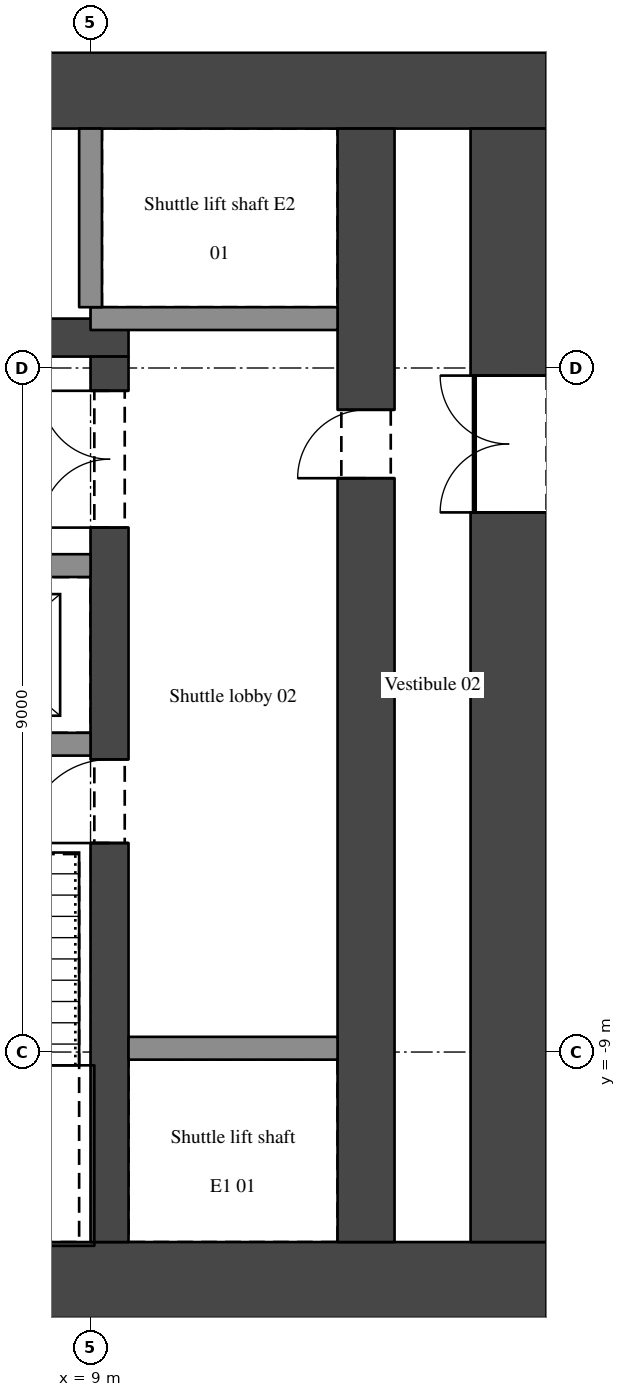
"""IFC4 building model, lengths in metres.
Left out: names, types, materials, properties, quantities, classifications, styles, units other than length and angle.
Written with IfcOpenShell. Run it as: python <this file> out.ifc"""

import sys

from ifc_helpers import new_model, si_unit, direction, frame, frame_2d, origin, place, context, subcontext, project, spatial, rectangle, extrude, element, fill, save


model = new_model("IFC4")
c1 = context("Model", 3, precision=1e-05, world=origin(), true_north=direction((0.0, 1.0)))
c2 = subcontext(c1, "Body", "Model", "MODEL_VIEW")
j1 = project(units=[si_unit("LENGTHUNIT", "METRE"), si_unit("PLANEANGLEUNIT", "RADIAN")], contexts=[c1])
p1 = place(None, origin())
s1 = spatial("IfcSite", under=j1, at=p1, CompositionType="ELEMENT")
p2 = place(p1, origin())
s2 = spatial("IfcBuilding", under=s1, at=p2, CompositionType="ELEMENT")
p3 = place(p2, frame((0.0, 0.0, 53.7)))
s3 = spatial("IfcBuildingStorey", under=s2, at=p3, CompositionType="ELEMENT", Elevation=53.7)
for number, where, z_axis, x_axis in (
    (1, (-15.0, -12.0, 0.0), (0.0, 0.0, 1.0), (1.0, 0.0, 0.0)),
    (2, (-15.0, 3.65, 0.0), (0.0, 0.0, 1.0), (1.0, 0.0, 0.0)),
):
    element("IfcWall", number, at=place(p3, frame(where, z_axis=z_axis, x_axis=x_axis)), inside=s3, PredefinedType="SHEAR", context=c2, shape_type="SweptSolid", body=[
        extrude(rectangle(XDim=30.0, YDim=1.0, at=frame_2d((15.0, 0.0))), origin(), (0.0, 0.0, 1.0), 3.9),
    ])
p4 = place(p3, frame((14.5, -11.5, 0.0), z_axis=(0.0, 0.0, 1.0), x_axis=(0.0, 1.0, 0.0)))
e3 = element("IfcWall", 3, at=p4, inside=s3, PredefinedType="SHEAR", context=c2, shape_type="SweptSolid", body=[
    extrude(rectangle(XDim=14.65, YDim=1.0, at=frame_2d((7.325, 0.0))), origin(), (0.0, 0.0, 1.0), 3.9),
])
p5 = place(p4, frame((9.6, 0.0, 0.0)))
e4 = element("IfcOpeningElement", 4, at=p5, cuts=e3, PredefinedType="OPENING", context=c2, shape_type="SweptSolid", body=[
    extrude(rectangle(XDim=1.8, YDim=2.1, at=frame_2d((0.9, 1.05))), frame((0.0, 0.51, 0.0), z_axis=(0.0, -1.0, 0.0), x_axis=(1.0, 0.0, 0.0)), (0.0, 0.0, 1.0), 1.02),
])
p6 = place(p3, frame((12.625, -11.5, 0.0), z_axis=(0.0, 0.0, 1.0), x_axis=(0.0, 1.0, 0.0)))
e5 = element("IfcWall", 5, at=p6, inside=s3, PredefinedType="SHEAR", context=c2, shape_type="SweptSolid", body=[
    extrude(rectangle(XDim=14.65, YDim=0.75, at=frame_2d((7.325, 0.0))), origin(), (0.0, 0.0, 1.0), 3.9),
])
p7 = place(p6, frame((10.05, 0.0, 0.0)))
e6 = element("IfcOpeningElement", 6, at=p7, cuts=e5, PredefinedType="OPENING", context=c2, shape_type="SweptSolid", body=[
    extrude(rectangle(XDim=0.9, YDim=2.1, at=frame_2d((0.45, 1.05))), frame((0.0, 0.385, 0.0), z_axis=(0.0, -1.0, 0.0), x_axis=(1.0, 0.0, 0.0)), (0.0, 0.0, 1.0), 0.77),
])
p8 = place(p3, frame((-9.5, 0.4, 0.0), z_axis=(0.0, 0.0, 1.0), x_axis=(1.0, 0.0, 0.0)))
e7 = element("IfcWall", 7, at=p8, inside=s3, PredefinedType="SHEAR", context=c2, shape_type="SweptSolid", body=[
    extrude(rectangle(XDim=19.0, YDim=0.5, at=frame_2d((9.5, 0.0))), origin(), (0.0, 0.0, 1.0), 3.9),
])
p9 = place(p8, frame((1.4, 0.0, 0.0)))
e8 = element("IfcOpeningElement", 8, at=p9, cuts=e7, PredefinedType="OPENING", context=c2, shape_type="SweptSolid", body=[
    extrude(rectangle(XDim=0.9, YDim=2.1, at=frame_2d((0.45, 1.05))), frame((0.0, 0.26, 0.0), z_axis=(0.0, -1.0, 0.0), x_axis=(1.0, 0.0, 0.0)), (0.0, 0.0, 1.0), 0.52),
])
p10 = place(p8, frame((4.1, 0.0, 0.0)))
e9 = element("IfcOpeningElement", 9, at=p10, cuts=e7, PredefinedType="OPENING", context=c2, shape_type="SweptSolid", body=[
    extrude(rectangle(XDim=0.9, YDim=2.1, at=frame_2d((0.45, 1.05))), frame((0.0, 0.26, 0.0), z_axis=(0.0, -1.0, 0.0), x_axis=(1.0, 0.0, 0.0)), (0.0, 0.0, 1.0), 0.52),
])
p11 = place(p8, frame((6.8, 0.0, 0.0)))
e10 = element("IfcOpeningElement", 10, at=p11, cuts=e7, PredefinedType="OPENING", context=c2, shape_type="SweptSolid", body=[
    extrude(rectangle(XDim=0.9, YDim=2.1, at=frame_2d((0.45, 1.05))), frame((0.0, 0.26, 0.0), z_axis=(0.0, -1.0, 0.0), x_axis=(1.0, 0.0, 0.0)), (0.0, 0.0, 1.0), 0.52),
])
p12 = place(p8, frame((11.3, 0.0, 0.0)))
e11 = element("IfcOpeningElement", 11, at=p12, cuts=e7, PredefinedType="OPENING", context=c2, shape_type="SweptSolid", body=[
    extrude(rectangle(XDim=0.9, YDim=2.1, at=frame_2d((0.45, 1.05))), frame((0.0, 0.26, 0.0), z_axis=(0.0, -1.0, 0.0), x_axis=(1.0, 0.0, 0.0)), (0.0, 0.0, 1.0), 0.52),
])
p13 = place(p8, frame((14.0, 0.0, 0.0)))
e12 = element("IfcOpeningElement", 12, at=p13, cuts=e7, PredefinedType="OPENING", context=c2, shape_type="SweptSolid", body=[
    extrude(rectangle(XDim=0.9, YDim=2.1, at=frame_2d((0.45, 1.05))), frame((0.0, 0.26, 0.0), z_axis=(0.0, -1.0, 0.0), x_axis=(1.0, 0.0, 0.0)), (0.0, 0.0, 1.0), 0.52),
])
p14 = place(p8, frame((16.7, 0.0, 0.0)))
e13 = element("IfcOpeningElement", 13, at=p14, cuts=e7, PredefinedType="OPENING", context=c2, shape_type="SweptSolid", body=[
    extrude(rectangle(XDim=0.9, YDim=2.1, at=frame_2d((0.45, 1.05))), frame((0.0, 0.26, 0.0), z_axis=(0.0, -1.0, 0.0), x_axis=(1.0, 0.0, 0.0)), (0.0, 0.0, 1.0), 0.52),
])
p15 = place(p8, frame((9.05, 0.0, 0.0)))
e14 = element("IfcOpeningElement", 14, at=p15, cuts=e7, PredefinedType="OPENING", context=c2, shape_type="SweptSolid", body=[
    extrude(rectangle(XDim=0.9, YDim=2.1, at=frame_2d((0.45, 1.05))), frame((0.0, 0.26, 0.0), z_axis=(0.0, -1.0, 0.0), x_axis=(1.0, 0.0, 0.0)), (0.0, 0.0, 1.0), 0.52),
])
p16 = place(p3, frame((9.25, -11.5, 0.0), z_axis=(0.0, 0.0, 1.0), x_axis=(0.0, 1.0, 0.0)))
e15 = element("IfcWall", 15, at=p16, inside=s3, PredefinedType="SHEAR", context=c2, shape_type="SweptSolid", body=[
    extrude(rectangle(XDim=11.65, YDim=0.5, at=frame_2d((5.825, 0.0))), origin(), (0.0, 0.0, 1.0), 3.9),
])
p17 = place(p16, frame((9.4, 0.0, 0.0)))
e16 = element("IfcOpeningElement", 16, at=p17, cuts=e15, PredefinedType="OPENING", context=c2, shape_type="SweptSolid", body=[
    extrude(rectangle(XDim=1.8, YDim=2.1, at=frame_2d((0.9, 1.05))), frame((0.0, 0.26, 0.0), z_axis=(0.0, -1.0, 0.0), x_axis=(1.0, 0.0, 0.0)), (0.0, 0.0, 1.0), 0.52),
])
p18 = place(p16, frame((5.25, 0.0, 0.0)))
e17 = element("IfcOpeningElement", 17, at=p18, cuts=e15, PredefinedType="OPENING", context=c2, shape_type="SweptSolid", body=[
    extrude(rectangle(XDim=1.1, YDim=2.1, at=frame_2d((0.55, 1.05))), frame((0.0, 0.26, 0.0), z_axis=(0.0, -1.0, 0.0), x_axis=(1.0, 0.0, 0.0)), (0.0, 0.0, 1.0), 0.52),
])
p19 = place(p3, frame((9.5, -8.95, 0.0), z_axis=(0.0, 0.0, 1.0), x_axis=(1.0, 0.0, 0.0)))
e18 = element("IfcWall", 18, at=p19, inside=s3, PredefinedType="SHEAR", context=c2, shape_type="SweptSolid", body=[
    extrude(rectangle(XDim=2.75, YDim=0.3, at=frame_2d((1.375, 0.0))), origin(), (0.0, 0.0, 1.0), 3.9),
])
p20 = place(p3, frame((0.9, -4.95, 0.0), z_axis=(0.0, 0.0, 1.0), x_axis=(1.0, 0.0, 0.0)))
e19 = element("IfcWall", 19, at=p20, inside=s3, PredefinedType="SHEAR", context=c2, shape_type="SweptSolid", body=[
    extrude(rectangle(XDim=8.1, YDim=0.3, at=frame_2d((4.05, 0.0))), origin(), (0.0, 0.0, 1.0), 3.9),
])
p21 = place(p3, frame((0.9, -2.6, 0.0), z_axis=(0.0, 0.0, 1.0), x_axis=(1.0, 0.0, 0.0)))
e20 = element("IfcWall", 20, at=p21, inside=s3, PredefinedType="SHEAR", context=c2, shape_type="SweptSolid", body=[
    extrude(rectangle(XDim=8.1, YDim=0.3, at=frame_2d((4.05, 0.0))), origin(), (0.0, 0.0, 1.0), 3.9),
])
p22 = place(p21, frame((0.8, 0.0, 0.0)))
e21 = element("IfcOpeningElement", 21, at=p22, cuts=e20, PredefinedType="OPENING", context=c2, shape_type="SweptSolid", body=[
    extrude(rectangle(XDim=1.1, YDim=2.1, at=frame_2d((0.55, 1.05))), frame((0.0, 0.16, 0.0), z_axis=(0.0, -1.0, 0.0), x_axis=(1.0, 0.0, 0.0)), (0.0, 0.0, 1.0), 0.32),
])
p23 = place(p21, frame((3.5, 0.0, 0.0)))
e22 = element("IfcOpeningElement", 22, at=p23, cuts=e20, PredefinedType="OPENING", context=c2, shape_type="SweptSolid", body=[
    extrude(rectangle(XDim=1.1, YDim=2.1, at=frame_2d((0.55, 1.05))), frame((0.0, 0.16, 0.0), z_axis=(0.0, -1.0, 0.0), x_axis=(1.0, 0.0, 0.0)), (0.0, 0.0, 1.0), 0.32),
])
p24 = place(p21, frame((6.2, 0.0, 0.0)))
e23 = element("IfcOpeningElement", 23, at=p24, cuts=e20, PredefinedType="OPENING", context=c2, shape_type="SweptSolid", body=[
    extrude(rectangle(XDim=1.1, YDim=2.1, at=frame_2d((0.55, 1.05))), frame((0.0, 0.16, 0.0), z_axis=(0.0, -1.0, 0.0), x_axis=(1.0, 0.0, 0.0)), (0.0, 0.0, 1.0), 0.32),
])
p25 = place(p3, frame((12.25, 0.65, 0.0), z_axis=(0.0, 0.0, 1.0), x_axis=(-1.0, 0.0, 0.0)))
e24 = element("IfcWall", 24, at=p25, inside=s3, PredefinedType="SHEAR", context=c2, shape_type="SweptSolid", body=[
    extrude(rectangle(XDim=3.25, YDim=0.3, at=frame_2d((1.625, 0.0))), origin(), (0.0, 0.0, 1.0), 3.9),
])
p26 = place(p3, frame((9.0, 0.8, 0.0), z_axis=(0.0, 0.0, 1.0), x_axis=(0.0, 1.0, 0.0)))
e25 = element("IfcWall", 25, at=p26, inside=s3, PredefinedType="SHEAR", context=c2, shape_type="SweptSolid", body=[
    extrude(rectangle(XDim=2.35, YDim=0.3, at=frame_2d((1.175, 0.0))), origin(), (0.0, 0.0, 1.0), 3.9),
])
p27 = place(p5, origin())
e26 = element("IfcDoor", 26, at=p27, inside=s3, OperationType="DOUBLE_DOOR_SINGLE_SWING", PredefinedType="DOOR", context=c2, shape_type="SweptSolid", body=[
    extrude(rectangle(XDim=1.8, YDim=2.1, at=frame_2d((0.9, 1.05))), frame((0.0, 0.025, 0.0), z_axis=(0.0, -1.0, 0.0), x_axis=(1.0, 0.0, 0.0)), (0.0, 0.0, 1.0), 0.05),
])
fill(e4, e26)
p28 = place(p17, origin())
e27 = element("IfcDoor", 27, at=p28, inside=s3, OperationType="DOUBLE_DOOR_SINGLE_SWING", PredefinedType="DOOR", context=c2, shape_type="SweptSolid", body=[
    extrude(rectangle(XDim=1.8, YDim=2.1, at=frame_2d((0.9, 1.05))), frame((0.0, 0.025, 0.0), z_axis=(0.0, -1.0, 0.0), x_axis=(1.0, 0.0, 0.0)), (0.0, 0.0, 1.0), 0.05),
])
fill(e16, e27)
p29 = place(p18, origin())
e28 = element("IfcDoor", 28, at=p29, inside=s3, OperationType="SINGLE_SWING_LEFT", PredefinedType="DOOR", context=c2, shape_type="SweptSolid", body=[
    extrude(rectangle(XDim=1.1, YDim=2.1, at=frame_2d((0.55, 1.05))), frame((0.0, 0.025, 0.0), z_axis=(0.0, -1.0, 0.0), x_axis=(1.0, 0.0, 0.0)), (0.0, 0.0, 1.0), 0.05),
])
fill(e17, e28)
p30 = place(p7, origin())
e29 = element("IfcDoor", 29, at=p30, inside=s3, OperationType="SINGLE_SWING_LEFT", PredefinedType="DOOR", context=c2, shape_type="SweptSolid", body=[
    extrude(rectangle(XDim=0.9, YDim=2.1, at=frame_2d((0.45, 1.05))), frame((0.0, 0.025, 0.0), z_axis=(0.0, -1.0, 0.0), x_axis=(1.0, 0.0, 0.0)), (0.0, 0.0, 1.0), 0.05),
])
fill(e6, e29)
save(model, sys.argv[1])
